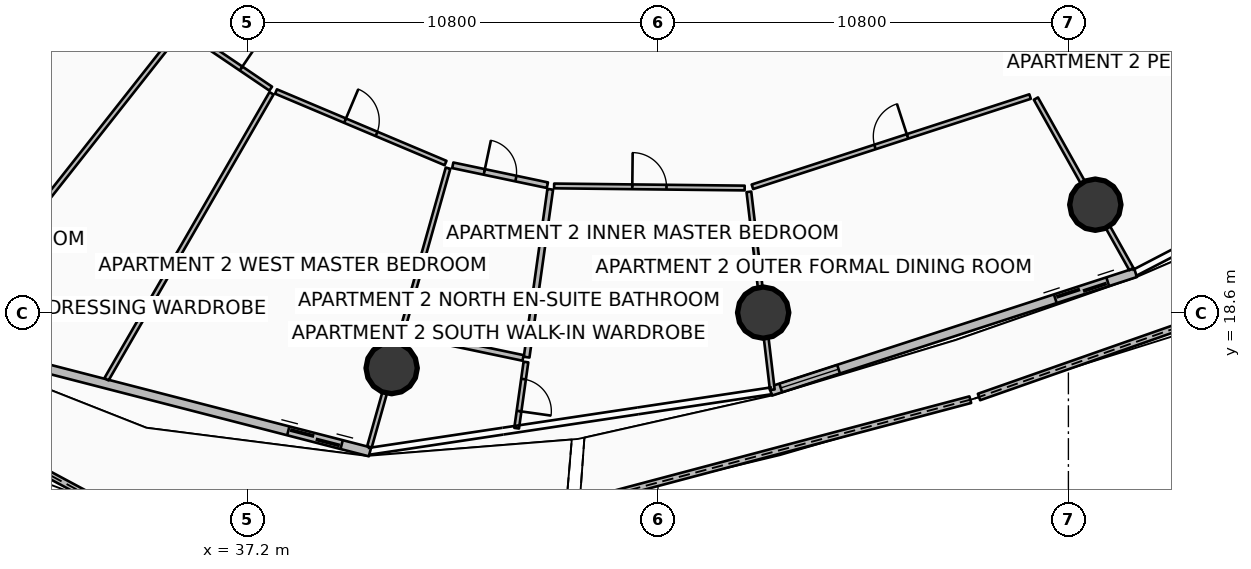
"""IFC4 building model, lengths in metres.
Left out: names, types, materials, properties, quantities, classifications, styles, units other than length and angle.
Written with IfcOpenShell. Run it as: python <this file> out.ifc"""

import sys

from ifc_helpers import new_model, si_unit, direction, frame, frame_2d, origin, origin_2d, place, context, subcontext, project, spatial, polyline, rectangle, circle, outline, extrude, element, fill, save


model = new_model("IFC4")
c1 = context("Model", 3, precision=1e-05, world=origin(), true_north=direction((0.0, 1.0)))
c2 = subcontext(c1, "Body", "Model", "MODEL_VIEW")
j1 = project(units=[si_unit("LENGTHUNIT", "METRE"), si_unit("PLANEANGLEUNIT", "RADIAN")], contexts=[c1])
p1 = place(None, origin())
s1 = spatial("IfcSite", under=j1, at=p1, CompositionType="ELEMENT")
p2 = place(p1, origin())
s2 = spatial("IfcBuilding", under=s1, at=p2, CompositionType="ELEMENT")
p3 = place(p2, frame((0.0, 0.0, 30.15)))
s3 = spatial("IfcBuildingStorey", under=s2, at=p3, CompositionType="ELEMENT", Elevation=30.15)
for number, where, z_axis, x_axis in (
    (1, (40.992, 17.151, 0.0), (0.0, 0.0, 1.0), (1.0, 0.0, 0.0)),
    (2, (50.768, 18.611, 0.0), (0.0, 0.0, 1.0), (1.0, 0.0, 0.0)),
    (3, (59.508, 21.45, 0.0), (0.0, 0.0, 1.0), (1.0, 0.0, 0.0)),
):
    element("IfcColumn", number, at=place(p3, frame(where, z_axis=z_axis, x_axis=x_axis)), inside=s3, PredefinedType="COLUMN", context=c2, shape_type="SweptSolid", body=[
        extrude(circle(Radius=0.675, at=origin_2d()), origin(), (0.0, 0.0, 1.0), 3.5),
    ])
p4 = place(p3, frame((22.126, 19.627, 0.0), z_axis=(0.0, 0.0, 1.0), x_axis=(0.881385944807, -0.472396884301, 0.0)))
e4 = element("IfcWall", 4, at=p4, inside=s3, PredefinedType="PARAPET", context=c2, shape_type="SweptSolid", body=[
    extrude(outline(polyline([(0.0, 0.0), (12.779, 0.0), (12.779, 1.632), (6.39, 1.798), (0.0, 1.86), (0.0, 0.0)])), frame((0.0, 0.09, 0.0), z_axis=(0.0, -1.0, 0.0), x_axis=(1.0, 0.0, 0.0)), (0.0, 0.0, 1.0), 0.18),
])
p5 = place(p3, frame((45.939, 13.594, 0.0), z_axis=(0.0, 0.0, 1.0), x_axis=(0.966585359961, 0.256344966614, 0.0)))
e5 = element("IfcWall", 5, at=p5, inside=s3, PredefinedType="PARAPET", context=c2, shape_type="SweptSolid", body=[
    extrude(outline(polyline([(0.0, 0.0), (10.634, 0.0), (10.635, 1.148), (5.317, 1.127), (0.0, 1.224), (0.0, 0.0)])), frame((0.0, 0.09, 0.0), z_axis=(0.0, -1.0, 0.0), x_axis=(1.0, 0.0, 0.0)), (0.0, 0.0, 1.0), 0.18),
])
p6 = place(p3, frame((56.447, 16.39, 0.0), z_axis=(0.0, 0.0, 1.0), x_axis=(0.943634553286, 0.330989168772, 0.0)))
e6 = element("IfcWall", 6, at=p6, inside=s3, PredefinedType="PARAPET", context=c2, shape_type="SweptSolid", body=[
    extrude(outline(polyline([(0.0, 0.0), (10.759, 0.0), (10.759, 1.483), (5.379, 1.284), (0.0, 1.148), (0.0, 0.0)])), frame((0.0, 0.09, 0.0), z_axis=(0.0, -1.0, 0.0), x_axis=(1.0, 0.0, 0.0)), (0.0, 0.0, 1.0), 0.18),
])
p7 = place(p3, frame((28.946, 17.904, 0.0), z_axis=(0.0, 0.0, 1.0), x_axis=(0.96833871487, -0.249640007378, 0.0)))
e7 = element("IfcWall", 7, at=p7, inside=s3, PredefinedType="SOLIDWALL", context=c2, shape_type="SweptSolid", body=[
    extrude(rectangle(XDim=11.851, YDim=0.24, at=frame_2d((5.926, 0.0))), origin(), (0.0, 0.0, 1.0), 2.45),
])
p8 = place(p7, frame((9.631, 0.0, 0.0)))
e8 = element("IfcOpeningElement", 8, at=p8, cuts=e7, PredefinedType="OPENING", context=c2, shape_type="SweptSolid", body=[
    extrude(rectangle(XDim=1.45, YDim=2.15, at=frame_2d((0.725, 1.075))), frame((0.0, 0.13, 0.0), z_axis=(0.0, -1.0, 0.0), x_axis=(1.0, 0.0, 0.0)), (0.0, 0.0, 1.0), 0.26),
])
p9 = place(p7, frame((0.28, 0.0, 0.65)))
e9 = element("IfcOpeningElement", 9, at=p9, cuts=e7, PredefinedType="OPENING", context=c2, shape_type="SweptSolid", body=[
    extrude(rectangle(XDim=1.6, YDim=1.5, at=frame_2d((0.8, 0.75))), frame((0.0, 0.13, 0.0), z_axis=(0.0, -1.0, 0.0), x_axis=(1.0, 0.0, 0.0)), (0.0, 0.0, 1.0), 0.26),
])
p10 = place(p3, frame((50.964, 16.542, 0.0), z_axis=(0.0, 0.0, 1.0), x_axis=(0.951054679225, 0.309022648238, 0.0)))
e10 = element("IfcWall", 10, at=p10, inside=s3, PredefinedType="SOLIDWALL", context=c2, shape_type="SweptSolid", body=[
    extrude(rectangle(XDim=10.097, YDim=0.24, at=frame_2d((5.048, 0.0))), origin(), (0.0, 0.0, 1.0), 2.45),
])
p11 = place(p10, frame((7.877, 0.0, 0.0)))
e11 = element("IfcOpeningElement", 11, at=p11, cuts=e10, PredefinedType="OPENING", context=c2, shape_type="SweptSolid", body=[
    extrude(rectangle(XDim=1.45, YDim=2.15, at=frame_2d((0.725, 1.075))), frame((0.0, 0.13, 0.0), z_axis=(0.0, -1.0, 0.0), x_axis=(1.0, 0.0, 0.0)), (0.0, 0.0, 1.0), 0.26),
])
p12 = place(p10, frame((0.28, 0.0, 0.65)))
e12 = element("IfcOpeningElement", 12, at=p12, cuts=e10, PredefinedType="OPENING", context=c2, shape_type="SweptSolid", body=[
    extrude(rectangle(XDim=1.6, YDim=1.5, at=frame_2d((0.8, 0.75))), frame((0.0, 0.13, 0.0), z_axis=(0.0, -1.0, 0.0), x_axis=(1.0, 0.0, 0.0)), (0.0, 0.0, 1.0), 0.26),
])
p13 = place(p3, frame((33.291, 27.947, 0.0), z_axis=(0.0, 0.0, 1.0), x_axis=(-0.72304195697, -0.690804117287, 0.0)))
e13 = element("IfcWall", 13, at=p13, inside=s3, PredefinedType="PARTITIONING", context=c2, shape_type="SweptSolid", body=[
    extrude(rectangle(XDim=10.36, YDim=0.125, at=frame_2d((5.18, 0.0))), origin(), (0.0, 0.0, 1.0), 2.94),
])
p14 = place(p3, frame((35.4, 26.017, 0.0), z_axis=(0.0, 0.0, 1.0), x_axis=(-0.619085809847, -0.785323347447, 0.0)))
e14 = element("IfcWall", 14, at=p14, inside=s3, PredefinedType="PARTITIONING", context=c2, shape_type="SweptSolid", body=[
    extrude(rectangle(XDim=10.322, YDim=0.125, at=frame_2d((5.161, 0.0))), origin(), (0.0, 0.0, 1.0), 2.867),
])
p15 = place(p3, frame((37.831, 24.381, 0.0), z_axis=(0.0, 0.0, 1.0), x_axis=(-0.499878153527, -0.866095740451, 0.0)))
e15 = element("IfcWall", 15, at=p15, inside=s3, PredefinedType="PARTITIONING", context=c2, shape_type="SweptSolid", body=[
    extrude(rectangle(XDim=8.687, YDim=0.125, at=frame_2d((4.344, 0.0))), origin(), (0.0, 0.0, 1.0), 2.94),
])
p16 = place(p3, frame((35.544, 26.039, 0.0), z_axis=(0.0, 0.0, 1.0), x_axis=(0.827867904516, -0.560923107629, 0.0)))
e16 = element("IfcWall", 16, at=p16, inside=s3, PredefinedType="PARTITIONING", context=c2, shape_type="SweptSolid", body=[
    extrude(rectangle(XDim=2.736, YDim=0.125, at=frame_2d((1.368, 0.0))), origin(), (0.0, 0.0, 1.0), 2.867),
])
p17 = place(p16, frame((0.943, 0.0, 0.0)))
e17 = element("IfcOpeningElement", 17, at=p17, cuts=e16, PredefinedType="OPENING", context=c2, shape_type="SweptSolid", body=[
    extrude(rectangle(XDim=0.85, YDim=2.06, at=frame_2d((0.425, 1.03))), frame((0.0, 0.073, 0.0), z_axis=(0.0, -1.0, 0.0), x_axis=(1.0, 0.0, 0.0)), (0.0, 0.0, 1.0), 0.145),
])
p18 = place(p3, frame((37.949, 24.428, 0.0), z_axis=(0.0, 0.0, 1.0), x_axis=(0.921391247889, -0.388636293098, 0.0)))
e18 = element("IfcWall", 18, at=p18, inside=s3, PredefinedType="PARTITIONING", context=c2, shape_type="SweptSolid", body=[
    extrude(rectangle(XDim=4.842, YDim=0.125, at=frame_2d((2.421, 0.0))), origin(), (0.0, 0.0, 1.0), 2.867),
])
p19 = place(p18, frame((1.971, 0.0, 0.0)))
e19 = element("IfcOpeningElement", 19, at=p19, cuts=e18, PredefinedType="OPENING", context=c2, shape_type="SweptSolid", body=[
    extrude(rectangle(XDim=0.9, YDim=2.08, at=frame_2d((0.45, 1.04))), frame((0.0, 0.073, 0.0), z_axis=(0.0, -1.0, 0.0), x_axis=(1.0, 0.0, 0.0)), (0.0, 0.0, 1.0), 0.145),
])
p20 = place(p3, frame((42.475, 22.411, 0.0), z_axis=(0.0, 0.0, 1.0), x_axis=(-0.271439615814, -0.96245547168, 0.0)))
e20 = element("IfcWall", 20, at=p20, inside=s3, PredefinedType="PARTITIONING", context=c2, shape_type="SweptSolid", body=[
    extrude(rectangle(XDim=7.619, YDim=0.125, at=frame_2d((3.81, 0.0))), origin(), (0.0, 0.0, 1.0), 2.867),
])
p21 = place(p3, frame((42.6, 22.487, 0.0), z_axis=(0.0, 0.0, 1.0), x_axis=(0.978579306251, -0.20587020517, 0.0)))
e21 = element("IfcWall", 21, at=p21, inside=s3, PredefinedType="PARTITIONING", context=c2, shape_type="SweptSolid", body=[
    extrude(rectangle(XDim=2.544, YDim=0.15, at=frame_2d((1.272, 0.0))), origin(), (0.0, 0.0, 1.0), 2.867),
])
p22 = place(p21, frame((0.847, 0.0, 0.0)))
e22 = element("IfcOpeningElement", 22, at=p22, cuts=e21, PredefinedType="OPENING", context=c2, shape_type="SweptSolid", body=[
    extrude(rectangle(XDim=0.85, YDim=2.06, at=frame_2d((0.425, 1.03))), frame((0.0, 0.085, 0.0), z_axis=(0.0, -1.0, 0.0), x_axis=(1.0, 0.0, 0.0)), (0.0, 0.0, 1.0), 0.17),
])
p23 = place(p3, frame((41.354, 18.069, 0.0), z_axis=(0.0, 0.0, 1.0), x_axis=(0.978588253421, -0.205827671283, 0.0)))
e23 = element("IfcWall", 23, at=p23, inside=s3, PredefinedType="PARTITIONING", context=c2, shape_type="SweptSolid", body=[
    extrude(rectangle(XDim=3.163, YDim=0.15, at=frame_2d((1.582, 0.0))), origin(), (0.0, 0.0, 1.0), 2.867),
])
p24 = place(p3, frame((45.165, 21.855, 0.0), z_axis=(0.0, 0.0, 1.0), x_axis=(-0.139367219172, -0.990240767804, 0.0)))
e24 = element("IfcWall", 24, at=p24, inside=s3, PredefinedType="PARTITIONING", context=c2, shape_type="SweptSolid", body=[
    extrude(rectangle(XDim=4.46, YDim=0.15, at=frame_2d((2.23, 0.0))), origin(), (0.0, 0.0, 1.0), 2.94),
])
p25 = place(p3, frame((44.526, 17.31, 0.0), z_axis=(0.0, 0.0, 1.0), x_axis=(-0.139282491489, -0.990252688744, 0.0)))
e25 = element("IfcWall", 25, at=p25, inside=s3, PredefinedType="PARTITIONING", context=c2, shape_type="SweptSolid", body=[
    extrude(rectangle(XDim=1.758, YDim=0.125, at=frame_2d((0.879, 0.0))), origin(), (0.0, 0.0, 1.0), 2.94),
])
p26 = place(p25, frame((0.454, 0.0, 0.0)))
e26 = element("IfcOpeningElement", 26, at=p26, cuts=e25, PredefinedType="OPENING", context=c2, shape_type="SweptSolid", body=[
    extrude(rectangle(XDim=0.85, YDim=2.06, at=frame_2d((0.425, 1.03))), frame((0.0, 0.073, 0.0), z_axis=(0.0, -1.0, 0.0), x_axis=(1.0, 0.0, 0.0)), (0.0, 0.0, 1.0), 0.145),
])
p27 = place(p3, frame((45.268, 21.944, 0.0), z_axis=(0.0, 0.0, 1.0), x_axis=(0.999939426187, -0.011006541512, 0.0)))
e27 = element("IfcWall", 27, at=p27, inside=s3, PredefinedType="PARTITIONING", context=c2, shape_type="SweptSolid", body=[
    extrude(rectangle(XDim=5.013, YDim=0.125, at=frame_2d((2.506, 0.0))), origin(), (0.0, 0.0, 1.0), 2.94),
])
p28 = place(p27, frame((2.056, 0.0, 0.0)))
e28 = element("IfcOpeningElement", 28, at=p28, cuts=e27, PredefinedType="OPENING", context=c2, shape_type="SweptSolid", body=[
    extrude(rectangle(XDim=0.9, YDim=2.08, at=frame_2d((0.45, 1.04))), frame((0.0, 0.073, 0.0), z_axis=(0.0, -1.0, 0.0), x_axis=(1.0, 0.0, 0.0)), (0.0, 0.0, 1.0), 0.145),
])
p29 = place(p3, frame((50.392, 21.788, 0.0), z_axis=(0.0, 0.0, 1.0), x_axis=(0.11749238711, -0.993073783246, 0.0)))
e29 = element("IfcWall", 29, at=p29, inside=s3, PredefinedType="PARTITIONING", context=c2, shape_type="SweptSolid", body=[
    extrude(rectangle(XDim=5.243, YDim=0.125, at=frame_2d((2.621, 0.0))), origin(), (0.0, 0.0, 1.0), 2.867),
])
p30 = place(p3, frame((57.945, 24.242, 0.0), z_axis=(0.0, 0.0, 1.0), x_axis=(0.488630834306, -0.872490634772, 0.0)))
e30 = element("IfcWall", 30, at=p30, inside=s3, PredefinedType="PARTITIONING", context=c2, shape_type="SweptSolid", body=[
    extrude(rectangle(XDim=5.143, YDim=0.125, at=frame_2d((2.571, 0.0))), origin(), (0.0, 0.0, 1.0), 2.867),
])
p31 = place(p3, frame((50.485, 21.921, 0.0), z_axis=(0.0, 0.0, 1.0), x_axis=(0.951055318468, 0.309020680883, 0.0)))
e31 = element("IfcWall", 31, at=p31, inside=s3, PredefinedType="PARTITIONING", context=c2, shape_type="SweptSolid", body=[
    extrude(rectangle(XDim=7.682, YDim=0.125, at=frame_2d((3.841, 0.0))), origin(), (0.0, 0.0, 1.0), 2.867),
])
p32 = place(p31, frame((3.391, 0.0, 0.0)))
e32 = element("IfcOpeningElement", 32, at=p32, cuts=e31, PredefinedType="OPENING", context=c2, shape_type="SweptSolid", body=[
    extrude(rectangle(XDim=0.9, YDim=2.08, at=frame_2d((0.45, 1.04))), frame((0.0, 0.073, 0.0), z_axis=(0.0, -1.0, 0.0), x_axis=(1.0, 0.0, 0.0)), (0.0, 0.0, 1.0), 0.145),
])
p33 = place(p8, origin())
e33 = element("IfcDoor", 33, at=p33, inside=s3, OperationType="DOUBLE_DOOR_SLIDING", PredefinedType="DOOR", context=c2, shape_type="SweptSolid", body=[
    extrude(rectangle(XDim=1.45, YDim=2.15, at=frame_2d((0.725, 1.075))), frame((0.0, 0.025, 0.0), z_axis=(0.0, -1.0, 0.0), x_axis=(1.0, 0.0, 0.0)), (0.0, 0.0, 1.0), 0.05),
])
fill(e8, e33)
p34 = place(p11, origin())
e34 = element("IfcDoor", 34, at=p34, inside=s3, OperationType="DOUBLE_DOOR_SLIDING", PredefinedType="DOOR", context=c2, shape_type="SweptSolid", body=[
    extrude(rectangle(XDim=1.45, YDim=2.15, at=frame_2d((0.725, 1.075))), frame((0.0, 0.025, 0.0), z_axis=(0.0, -1.0, 0.0), x_axis=(1.0, 0.0, 0.0)), (0.0, 0.0, 1.0), 0.05),
])
fill(e11, e34)
p35 = place(p12, origin())
e35 = element("IfcWindow", 35, at=p35, inside=s3, PartitioningType="SINGLE_PANEL", PredefinedType="WINDOW", context=c2, shape_type="SweptSolid", body=[
    extrude(rectangle(XDim=1.6, YDim=1.5, at=frame_2d((0.8, 0.75))), frame((0.0, 0.03, 0.0), z_axis=(0.0, -1.0, 0.0), x_axis=(1.0, 0.0, 0.0)), (0.0, 0.0, 1.0), 0.06),
])
fill(e12, e35)
p36 = place(p17, origin())
e36 = element("IfcDoor", 36, at=p36, inside=s3, OperationType="SINGLE_SWING_RIGHT", PredefinedType="DOOR", context=c2, shape_type="SweptSolid", body=[
    extrude(rectangle(XDim=0.85, YDim=2.06, at=frame_2d((0.425, 1.03))), frame((0.0, 0.025, 0.0), z_axis=(0.0, -1.0, 0.0), x_axis=(1.0, 0.0, 0.0)), (0.0, 0.0, 1.0), 0.05),
])
fill(e17, e36)
p37 = place(p19, origin())
e37 = element("IfcDoor", 37, at=p37, inside=s3, OperationType="SINGLE_SWING_LEFT", PredefinedType="DOOR", context=c2, shape_type="SweptSolid", body=[
    extrude(rectangle(XDim=0.9, YDim=2.08, at=frame_2d((0.45, 1.04))), frame((0.0, 0.025, 0.0), z_axis=(0.0, -1.0, 0.0), x_axis=(1.0, 0.0, 0.0)), (0.0, 0.0, 1.0), 0.05),
])
fill(e19, e37)
p38 = place(p22, origin())
e38 = element("IfcDoor", 38, at=p38, inside=s3, OperationType="SINGLE_SWING_LEFT", PredefinedType="DOOR", context=c2, shape_type="SweptSolid", body=[
    extrude(rectangle(XDim=0.85, YDim=2.06, at=frame_2d((0.425, 1.03))), frame((0.0, 0.025, 0.0), z_axis=(0.0, -1.0, 0.0), x_axis=(1.0, 0.0, 0.0)), (0.0, 0.0, 1.0), 0.05),
])
fill(e22, e38)
p39 = place(p26, origin())
e39 = element("IfcDoor", 39, at=p39, inside=s3, OperationType="SINGLE_SWING_RIGHT", PredefinedType="DOOR", context=c2, shape_type="SweptSolid", body=[
    extrude(rectangle(XDim=0.85, YDim=2.06, at=frame_2d((0.425, 1.03))), frame((0.0, 0.025, 0.0), z_axis=(0.0, -1.0, 0.0), x_axis=(1.0, 0.0, 0.0)), (0.0, 0.0, 1.0), 0.05),
])
fill(e26, e39)
p40 = place(p28, origin())
e40 = element("IfcDoor", 40, at=p40, inside=s3, OperationType="SINGLE_SWING_LEFT", PredefinedType="DOOR", context=c2, shape_type="SweptSolid", body=[
    extrude(rectangle(XDim=0.9, YDim=2.08, at=frame_2d((0.45, 1.04))), frame((0.0, 0.025, 0.0), z_axis=(0.0, -1.0, 0.0), x_axis=(1.0, 0.0, 0.0)), (0.0, 0.0, 1.0), 0.05),
])
fill(e28, e40)
p41 = place(p32, origin())
e41 = element("IfcDoor", 41, at=p41, inside=s3, OperationType="SINGLE_SWING_RIGHT", PredefinedType="DOOR", context=c2, shape_type="SweptSolid", body=[
    extrude(rectangle(XDim=0.9, YDim=2.08, at=frame_2d((0.45, 1.04))), frame((0.0, 0.025, 0.0), z_axis=(0.0, -1.0, 0.0), x_axis=(1.0, 0.0, 0.0)), (0.0, 0.0, 1.0), 0.05),
])
fill(e32, e41)
save(model, sys.argv[1])
